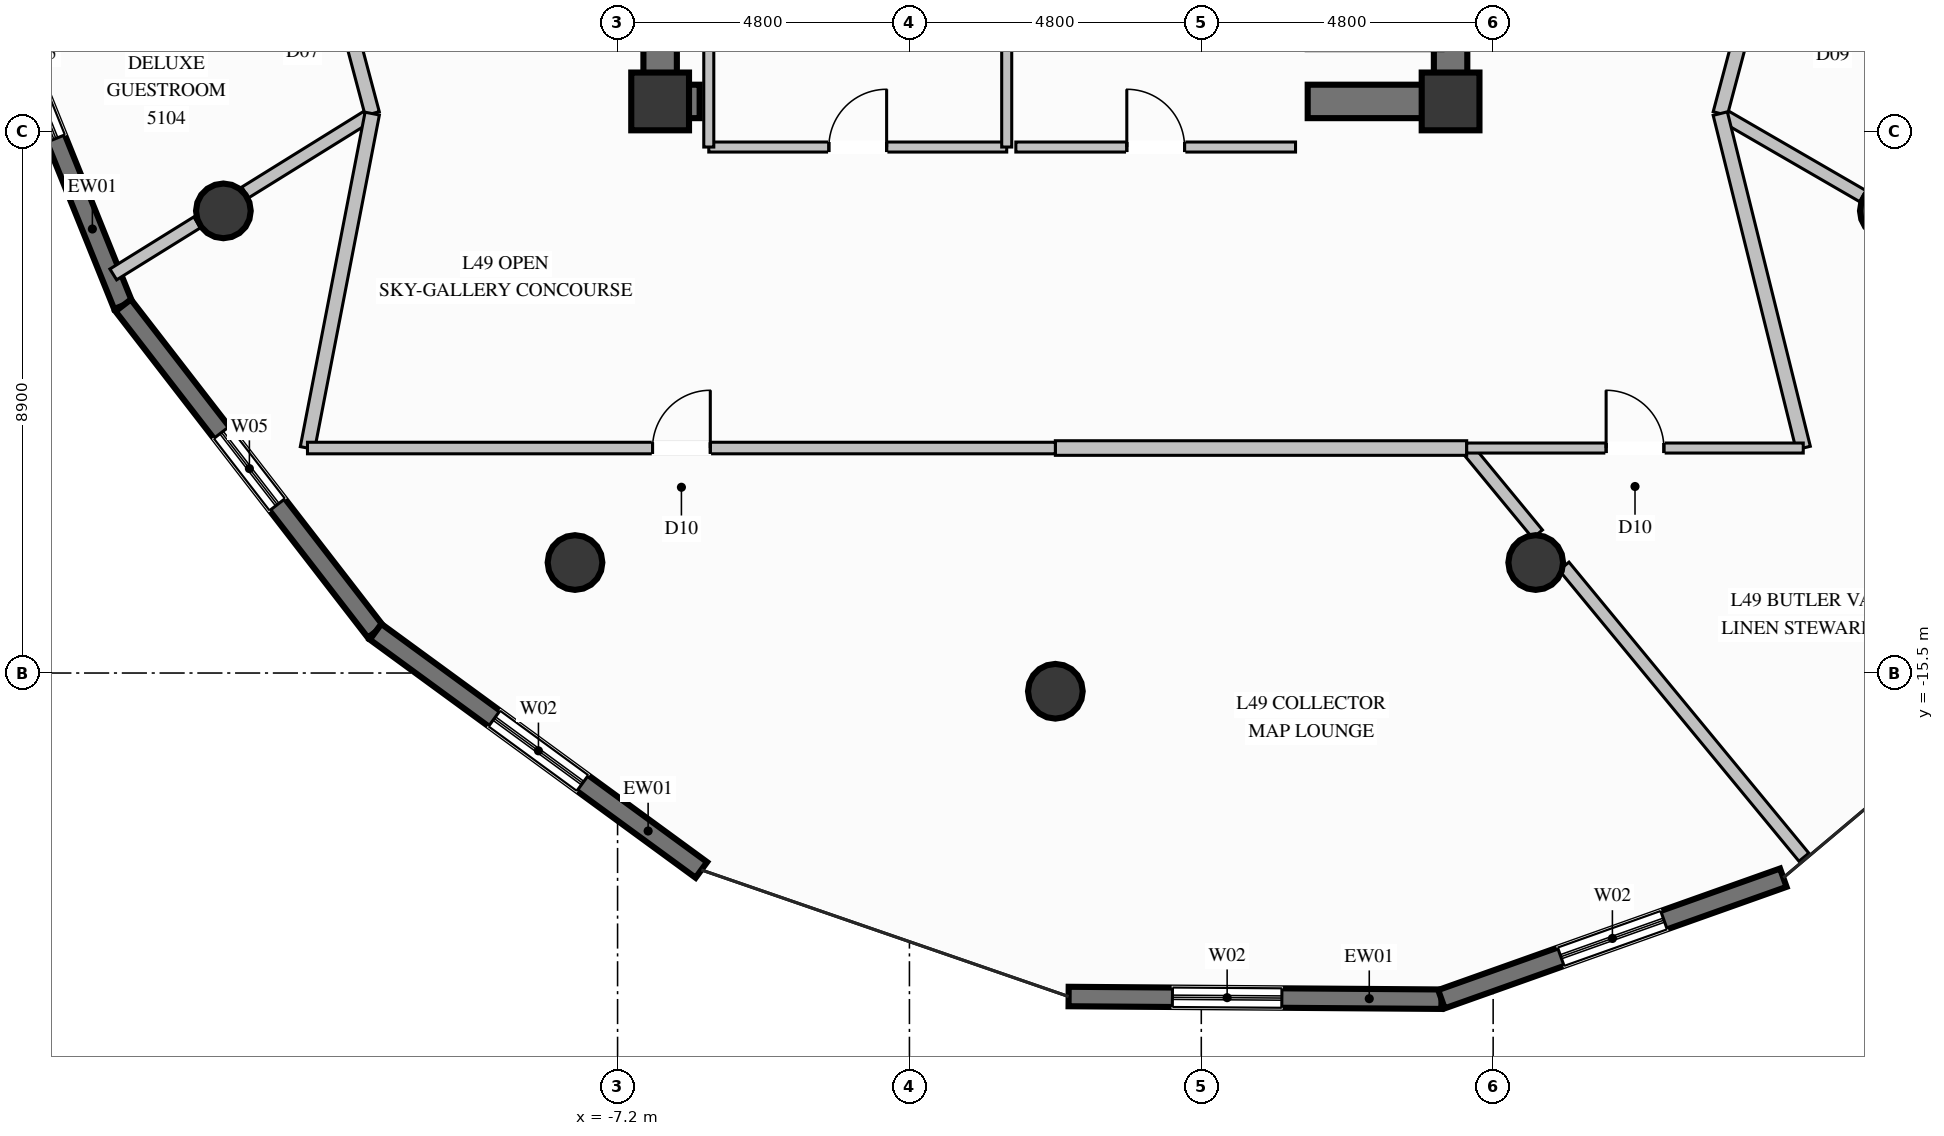
"""IFC4 building model, lengths in metres.
Left out: names, types, materials, properties, quantities, classifications, styles, units other than length and angle.
Written with IfcOpenShell. Run it as: python <this file> out.ifc"""

import sys

from ifc_helpers import new_model, si_unit, direction, frame, frame_2d, origin, origin_2d, place, context, subcontext, project, spatial, rectangle, circle, extrude, element, fill, save


model = new_model("IFC4")
c1 = context("Model", 3, precision=1e-05, world=origin(), true_north=direction((0.0, 1.0)))
c2 = subcontext(c1, "Body", "Model", "MODEL_VIEW")
j1 = project(units=[si_unit("LENGTHUNIT", "METRE"), si_unit("PLANEANGLEUNIT", "RADIAN")], contexts=[c1])
p1 = place(None, origin())
s1 = spatial("IfcSite", under=j1, at=p1, CompositionType="ELEMENT")
p2 = place(p1, origin())
s2 = spatial("IfcBuilding", under=s1, at=p2, CompositionType="ELEMENT")
p3 = place(p2, frame((0.0, 0.0, 191.2)))
s3 = spatial("IfcBuildingStorey", under=s2, at=p3, CompositionType="ELEMENT", Elevation=191.2)
for number, where, z_axis, x_axis in (
    (1, (-6.5, -6.1, 0.0), (0.0, 0.0, 1.0), (1.0, 0.0, 0.0)),
    (2, (6.5, -6.1, 0.0), (0.0, 0.0, 1.0), (1.0, 0.0, 0.0)),
):
    element("IfcColumn", number, at=place(p3, frame(where, z_axis=z_axis, x_axis=x_axis)), inside=s3, PredefinedType="COLUMN", context=c2, shape_type="SweptSolid", body=[
        extrude(rectangle(XDim=0.95, YDim=0.95, at=origin_2d()), origin(), (0.0, 0.0, 1.0), 3.6),
    ])
p4 = place(p3, frame((-6.225, -6.1, 0.0), z_axis=(0.0, 0.0, 1.0), x_axis=(1.0, 0.0, 0.0)))
e3 = element("IfcWall", 3, at=p4, inside=s3, PredefinedType="SHEAR", context=c2, shape_type="SweptSolid", body=[
    extrude(rectangle(XDim=0.375, YDim=0.55, at=frame_2d((0.188, 0.0))), origin(), (0.0, 0.0, 1.0), 3.6),
])
p5 = place(p3, frame((4.15, -6.1, 0.0), z_axis=(0.0, 0.0, 1.0), x_axis=(1.0, 0.0, 0.0)))
e4 = element("IfcWall", 4, at=p5, inside=s3, PredefinedType="SHEAR", context=c2, shape_type="SweptSolid", body=[
    extrude(rectangle(XDim=2.075, YDim=0.55, at=frame_2d((1.038, 0.0))), origin(), (0.0, 0.0, 1.0), 3.6),
])
p6 = place(p3, frame((-6.5, -6.375, 0.0), z_axis=(0.0, 0.0, 1.0), x_axis=(0.0, 1.0, 0.0)))
e5 = element("IfcWall", 5, at=p6, inside=s3, PredefinedType="SHEAR", context=c2, shape_type="SweptSolid", body=[
    extrude(rectangle(XDim=3.025, YDim=0.55, at=frame_2d((1.512, 0.0))), origin(), (0.0, 0.0, 1.0), 3.6),
])
p7 = place(p3, frame((6.5, -6.375, 0.0), z_axis=(0.0, 0.0, 1.0), x_axis=(0.0, 1.0, 0.0)))
e6 = element("IfcWall", 6, at=p7, inside=s3, PredefinedType="SHEAR", context=c2, shape_type="SweptSolid", body=[
    extrude(rectangle(XDim=4.025, YDim=0.55, at=frame_2d((2.012, 0.0))), origin(), (0.0, 0.0, 1.0), 3.6),
])
for number, where, z_axis, x_axis in (
    (7, (-13.683, -7.9, 0.0), (0.0, 0.0, 1.0), (1.0, 0.0, 0.0)),
    (8, (-7.9, -13.683, 0.0), (0.0, 0.0, 1.0), (1.0, 0.0, 0.0)),
    (9, (0.0, -15.8, 0.0), (0.0, 0.0, 1.0), (1.0, 0.0, 0.0)),
    (10, (7.9, -13.683, 0.0), (0.0, 0.0, 1.0), (1.0, 0.0, 0.0)),
    (11, (13.683, -7.9, 0.0), (0.0, 0.0, 1.0), (1.0, 0.0, 0.0)),
):
    element("IfcColumn", number, at=place(p3, frame(where, z_axis=z_axis, x_axis=x_axis)), inside=s3, PredefinedType="COLUMN", context=c2, shape_type="SweptSolid", body=[
        extrude(circle(Radius=0.45, at=origin_2d()), origin(), (0.0, 0.0, 1.0), 3.6),
    ])
p8 = place(p3, frame((-15.331, -9.454, 0.0), z_axis=(0.0, 0.0, 1.0), x_axis=(-0.374000779889, 0.927428388956, 0.0)))
e12 = element("IfcWall", 12, at=p8, inside=s3, PredefinedType="SOLIDWALL", context=c2, shape_type="SweptSolid", body=[
    extrude(rectangle(XDim=6.786, YDim=0.32, at=frame_2d((3.393, 0.0))), origin(), (0.0, 0.0, 1.0), 3.36),
])
p9 = place(p8, frame((2.959, 0.0, 0.85)))
e13 = element("IfcOpeningElement", 13, at=p9, cuts=e12, PredefinedType="OPENING", context=c2, shape_type="SweptSolid", body=[
    extrude(rectangle(XDim=1.5, YDim=1.2, at=frame_2d((0.75, 0.6))), frame((0.0, 0.17, 0.0), z_axis=(0.0, -1.0, 0.0), x_axis=(1.0, 0.0, 0.0)), (0.0, 0.0, 1.0), 0.34),
])
p10 = place(p3, frame((-11.18, -14.821, 0.0), z_axis=(0.0, 0.0, 1.0), x_axis=(-0.611810985794, 0.791003993455, 0.0)))
e14 = element("IfcWall", 14, at=p10, inside=s3, PredefinedType="SOLIDWALL", context=c2, shape_type="SweptSolid", body=[
    extrude(rectangle(XDim=6.785, YDim=0.32, at=frame_2d((3.393, 0.0))), origin(), (0.0, 0.0, 1.0), 3.36),
])
p11 = place(p10, frame((2.642, 0.0, 0.85)))
e15 = element("IfcOpeningElement", 15, at=p11, cuts=e14, PredefinedType="OPENING", context=c2, shape_type="SweptSolid", body=[
    extrude(rectangle(XDim=1.5, YDim=1.2, at=frame_2d((0.75, 0.6))), frame((0.0, 0.17, 0.0), z_axis=(0.0, -1.0, 0.0), x_axis=(1.0, 0.0, 0.0)), (0.0, 0.0, 1.0), 0.34),
])
p12 = place(p3, frame((-5.822, -18.738, 0.0), z_axis=(0.0, 0.0, 1.0), x_axis=(-0.80727653181, 0.590173365368, 0.0)))
e16 = element("IfcWall", 16, at=p12, inside=s3, PredefinedType="SOLIDWALL", context=c2, shape_type="SweptSolid", body=[
    extrude(rectangle(XDim=6.637, YDim=0.32, at=frame_2d((3.318, 0.0))), origin(), (0.0, 0.0, 1.0), 3.36),
])
p13 = place(p12, frame((2.419, 0.0, 0.35)))
e17 = element("IfcOpeningElement", 17, at=p13, cuts=e16, PredefinedType="OPENING", context=c2, shape_type="SweptSolid", body=[
    extrude(rectangle(XDim=1.8, YDim=2.6, at=frame_2d((0.9, 1.3))), frame((0.0, 0.17, 0.0), z_axis=(0.0, -1.0, 0.0), x_axis=(1.0, 0.0, 0.0)), (0.0, 0.0, 1.0), 0.34),
])
p14 = place(p3, frame((6.35, -20.864, 0.0), z_axis=(0.0, 0.0, 1.0), x_axis=(-0.999974321908, 0.007166276942, 0.0)))
e18 = element("IfcWall", 18, at=p14, inside=s3, PredefinedType="SOLIDWALL", context=c2, shape_type="SweptSolid", body=[
    extrude(rectangle(XDim=6.132, YDim=0.32, at=frame_2d((3.066, 0.0))), origin(), (0.0, 0.0, 1.0), 3.36),
])
p15 = place(p14, frame((2.625, 0.0, 0.35)))
e19 = element("IfcOpeningElement", 19, at=p15, cuts=e18, PredefinedType="OPENING", context=c2, shape_type="SweptSolid", body=[
    extrude(rectangle(XDim=1.8, YDim=2.6, at=frame_2d((0.9, 1.3))), frame((0.0, 0.17, 0.0), z_axis=(0.0, -1.0, 0.0), x_axis=(1.0, 0.0, 0.0)), (0.0, 0.0, 1.0), 0.34),
])
p16 = place(p3, frame((11.972, -18.866, 0.0), z_axis=(0.0, 0.0, 1.0), x_axis=(-0.942258310851, -0.334886959483, 0.0)))
e20 = element("IfcWall", 20, at=p16, inside=s3, PredefinedType="SOLIDWALL", context=c2, shape_type="SweptSolid", body=[
    extrude(rectangle(XDim=5.966, YDim=0.32, at=frame_2d((2.983, 0.0))), origin(), (0.0, 0.0, 1.0), 3.36),
])
p17 = place(p16, frame((2.083, 0.0, 0.35)))
e21 = element("IfcOpeningElement", 21, at=p17, cuts=e20, PredefinedType="OPENING", context=c2, shape_type="SweptSolid", body=[
    extrude(rectangle(XDim=1.8, YDim=2.6, at=frame_2d((0.9, 1.3))), frame((0.0, 0.17, 0.0), z_axis=(0.0, -1.0, 0.0), x_axis=(1.0, 0.0, 0.0)), (0.0, 0.0, 1.0), 0.34),
])
p18 = place(p3, frame((-5.7, -6.85, 0.0), z_axis=(0.0, 0.0, 1.0), x_axis=(1.0, 0.0, 0.0)))
e22 = element("IfcWall", 22, at=p18, inside=s3, PredefinedType="PARTITIONING", context=c2, shape_type="SweptSolid", body=[
    extrude(rectangle(XDim=4.9, YDim=0.165, at=frame_2d((2.45, 0.0))), origin(), (0.0, 0.0, 1.0), 2.445),
])
p19 = place(p18, frame((1.975, 0.0, 0.0)))
e23 = element("IfcOpeningElement", 23, at=p19, cuts=e22, PredefinedType="OPENING", context=c2, shape_type="SweptSolid", body=[
    extrude(rectangle(XDim=0.95, YDim=2.1, at=frame_2d((0.475, 1.05))), frame((0.0, 0.093, 0.0), z_axis=(0.0, -1.0, 0.0), x_axis=(1.0, 0.0, 0.0)), (0.0, 0.0, 1.0), 0.185),
])
p20 = place(p3, frame((-0.8, -6.85, 0.0), z_axis=(0.0, 0.0, 1.0), x_axis=(0.0, 1.0, 0.0)))
e24 = element("IfcWall", 24, at=p20, inside=s3, PredefinedType="PARTITIONING", context=c2, shape_type="SweptSolid", body=[
    extrude(rectangle(XDim=3.35, YDim=0.165, at=frame_2d((1.675, 0.0))), origin(), (0.0, 0.0, 1.0), 3.36),
])
p21 = place(p3, frame((-5.7, -3.5, 0.0), z_axis=(0.0, 0.0, 1.0), x_axis=(0.0, -1.0, 0.0)))
e25 = element("IfcWall", 25, at=p21, inside=s3, PredefinedType="PARTITIONING", context=c2, shape_type="SweptSolid", body=[
    extrude(rectangle(XDim=3.35, YDim=0.165, at=frame_2d((1.675, 0.0))), origin(), (0.0, 0.0, 1.0), 2.445),
])
p22 = place(p3, frame((-0.65, -6.85, 0.0), z_axis=(0.0, 0.0, 1.0), x_axis=(1.0, 0.0, 0.0)))
e26 = element("IfcWall", 26, at=p22, inside=s3, PredefinedType="PARTITIONING", context=c2, shape_type="SweptSolid", body=[
    extrude(rectangle(XDim=4.6, YDim=0.165, at=frame_2d((2.3, 0.0))), origin(), (0.0, 0.0, 1.0), 2.445),
])
p23 = place(p22, frame((1.825, 0.0, 0.0)))
e27 = element("IfcOpeningElement", 27, at=p23, cuts=e26, PredefinedType="OPENING", context=c2, shape_type="SweptSolid", body=[
    extrude(rectangle(XDim=0.95, YDim=2.1, at=frame_2d((0.475, 1.05))), frame((0.0, 0.093, 0.0), z_axis=(0.0, -1.0, 0.0), x_axis=(1.0, 0.0, 0.0)), (0.0, 0.0, 1.0), 0.185),
])
p24 = place(p3, frame((-11.235, -6.3, 0.0), z_axis=(0.0, 0.0, 1.0), x_axis=(-0.8495787928, -0.527461728302, 0.0)))
e28 = element("IfcWall", 28, at=p24, inside=s3, PredefinedType="PARTITIONING", context=c2, shape_type="SweptSolid", body=[
    extrude(rectangle(XDim=2.459, YDim=0.21, at=frame_2d((1.229, 0.0))), origin(), (0.0, 0.0, 1.0), 2.876),
])
p25 = place(p3, frame((-14.114, -8.088, 0.0), z_axis=(0.0, 0.0, 1.0), x_axis=(-0.849447375162, -0.527673342922, 0.0)))
e29 = element("IfcWall", 29, at=p25, inside=s3, PredefinedType="PARTITIONING", context=c2, shape_type="SweptSolid", body=[
    extrude(rectangle(XDim=1.625, YDim=0.21, at=frame_2d((0.812, 0.0))), origin(), (0.0, 0.0, 1.0), 3.36),
])
p26 = place(p3, frame((10.935, -6.3, 0.0), z_axis=(0.0, 0.0, 1.0), x_axis=(0.865378990195, -0.50111795351, 0.0)))
e30 = element("IfcWall", 30, at=p26, inside=s3, PredefinedType="PARTITIONING", context=c2, shape_type="SweptSolid", body=[
    extrude(rectangle(XDim=2.71, YDim=0.21, at=frame_2d((1.355, 0.0))), origin(), (0.0, 0.0, 1.0), 2.876),
])
p27 = place(p3, frame((-12.23, -2.559, 0.0), z_axis=(0.0, 0.0, 1.0), x_axis=(0.257007037833, -0.966409531464, 0.0)))
e31 = element("IfcWall", 31, at=p27, inside=s3, PredefinedType="PARTITIONING", context=c2, shape_type="SweptSolid", body=[
    extrude(rectangle(XDim=3.871, YDim=0.24, at=frame_2d((1.936, 0.0))), origin(), (0.0, 0.0, 1.0), 3.36),
])
p28 = place(p27, frame((1.436, 0.0, 0.0)))
e32 = element("IfcOpeningElement", 32, at=p28, cuts=e31, PredefinedType="OPENING", context=c2, shape_type="SweptSolid", body=[
    extrude(rectangle(XDim=1.0, YDim=2.2, at=frame_2d((0.5, 1.1))), frame((0.0, 0.13, 0.0), z_axis=(0.0, -1.0, 0.0), x_axis=(1.0, 0.0, 0.0)), (0.0, 0.0, 1.0), 0.26),
])
p29 = place(p3, frame((10.935, -6.3, 0.0), z_axis=(0.0, 0.0, 1.0), x_axis=(0.25685481711, 0.966450000221, 0.0)))
e33 = element("IfcWall", 33, at=p29, inside=s3, PredefinedType="PARTITIONING", context=c2, shape_type="SweptSolid", body=[
    extrude(rectangle(XDim=2.803, YDim=0.24, at=frame_2d((1.401, 0.0))), origin(), (0.0, 0.0, 1.0), 3.36),
])
p30 = place(p3, frame((6.765, -11.8, 0.0), z_axis=(0.0, 0.0, 1.0), x_axis=(0.635875381736, -0.771791745811, 0.0)))
e34 = element("IfcWall", 34, at=p30, inside=s3, PredefinedType="PARTITIONING", context=c2, shape_type="SweptSolid", body=[
    extrude(rectangle(XDim=1.832, YDim=0.21, at=frame_2d((0.916, 0.0))), origin(), (0.0, 0.0, 1.0), 3.36),
])
p31 = place(p3, frame((8.366, -13.743, 0.0), z_axis=(0.0, 0.0, 1.0), x_axis=(0.636047975174, -0.771649514532, 0.0)))
e35 = element("IfcWall", 35, at=p31, inside=s3, PredefinedType="PARTITIONING", context=c2, shape_type="SweptSolid", body=[
    extrude(rectangle(XDim=6.202, YDim=0.21, at=frame_2d((3.101, 0.0))), origin(), (0.0, 0.0, 1.0), 3.36),
])
p32 = place(p3, frame((-11.235, -6.3, 0.0), z_axis=(0.0, 0.0, 1.0), x_axis=(-0.190095078136, -0.981765685522, 0.0)))
e36 = element("IfcWall", 36, at=p32, inside=s3, PredefinedType="PARTITIONING", context=c2, shape_type="SweptSolid", body=[
    extrude(rectangle(XDim=5.602, YDim=0.24, at=frame_2d((2.801, 0.0))), origin(), (0.0, 0.0, 1.0), 3.36),
])
p33 = place(p3, frame((0.0, -11.8, 0.0), z_axis=(0.0, 0.0, 1.0), x_axis=(1.0, 0.0, 0.0)))
e37 = element("IfcWall", 37, at=p33, inside=s3, PredefinedType="PARTITIONING", context=c2, shape_type="SweptSolid", body=[
    extrude(rectangle(XDim=6.765, YDim=0.24, at=frame_2d((3.382, 0.0))), origin(), (0.0, 0.0, 1.0), 3.36),
])
p34 = place(p3, frame((-12.3, -11.8, 0.0), z_axis=(0.0, 0.0, 1.0), x_axis=(1.0, 0.0, 0.0)))
e38 = element("IfcWall", 38, at=p34, inside=s3, PredefinedType="PARTITIONING", context=c2, shape_type="SweptSolid", body=[
    extrude(rectangle(XDim=12.3, YDim=0.19, at=frame_2d((6.15, 0.0))), origin(), (0.0, 0.0, 1.0), 3.36),
])
p35 = place(p34, frame((5.675, 0.0, 0.0)))
e39 = element("IfcOpeningElement", 39, at=p35, cuts=e38, PredefinedType="OPENING", context=c2, shape_type="SweptSolid", body=[
    extrude(rectangle(XDim=0.95, YDim=2.1, at=frame_2d((0.475, 1.05))), frame((0.0, 0.105, 0.0), z_axis=(0.0, -1.0, 0.0), x_axis=(1.0, 0.0, 0.0)), (0.0, 0.0, 1.0), 0.21),
])
p36 = place(p3, frame((12.3, -11.8, 0.0), z_axis=(0.0, 0.0, 1.0), x_axis=(-0.240872801332, 0.970556692614, 0.0)))
e40 = element("IfcWall", 40, at=p36, inside=s3, PredefinedType="PARTITIONING", context=c2, shape_type="SweptSolid", body=[
    extrude(rectangle(XDim=5.667, YDim=0.24, at=frame_2d((2.833, 0.0))), origin(), (0.0, 0.0, 1.0), 3.36),
])
p37 = place(p3, frame((6.765, -11.8, 0.0), z_axis=(0.0, 0.0, 1.0), x_axis=(1.0, 0.0, 0.0)))
e41 = element("IfcWall", 41, at=p37, inside=s3, PredefinedType="PARTITIONING", context=c2, shape_type="SweptSolid", body=[
    extrude(rectangle(XDim=5.535, YDim=0.165, at=frame_2d((2.768, 0.0))), origin(), (0.0, 0.0, 1.0), 3.36),
])
p38 = place(p37, frame((2.293, 0.0, 0.0)))
e42 = element("IfcOpeningElement", 42, at=p38, cuts=e41, PredefinedType="OPENING", context=c2, shape_type="SweptSolid", body=[
    extrude(rectangle(XDim=0.95, YDim=2.1, at=frame_2d((0.475, 1.05))), frame((0.0, 0.093, 0.0), z_axis=(0.0, -1.0, 0.0), x_axis=(1.0, 0.0, 0.0)), (0.0, 0.0, 1.0), 0.185),
])
p39 = place(p9, origin())
e43 = element("IfcWindow", 43, at=p39, inside=s3, PartitioningType="SINGLE_PANEL", PredefinedType="WINDOW", context=c2, shape_type="SweptSolid", body=[
    extrude(rectangle(XDim=1.5, YDim=1.2, at=frame_2d((0.75, 0.6))), frame((0.0, 0.03, 0.0), z_axis=(0.0, -1.0, 0.0), x_axis=(1.0, 0.0, 0.0)), (0.0, 0.0, 1.0), 0.06),
])
fill(e13, e43)
p40 = place(p11, origin())
e44 = element("IfcWindow", 44, at=p40, inside=s3, PartitioningType="SINGLE_PANEL", PredefinedType="WINDOW", context=c2, shape_type="SweptSolid", body=[
    extrude(rectangle(XDim=1.5, YDim=1.2, at=frame_2d((0.75, 0.6))), frame((0.0, 0.03, 0.0), z_axis=(0.0, -1.0, 0.0), x_axis=(1.0, 0.0, 0.0)), (0.0, 0.0, 1.0), 0.06),
])
fill(e15, e44)
p41 = place(p13, origin())
e45 = element("IfcWindow", 45, at=p41, inside=s3, PartitioningType="SINGLE_PANEL", PredefinedType="WINDOW", context=c2, shape_type="SweptSolid", body=[
    extrude(rectangle(XDim=1.8, YDim=2.6, at=frame_2d((0.9, 1.3))), frame((0.0, 0.03, 0.0), z_axis=(0.0, -1.0, 0.0), x_axis=(1.0, 0.0, 0.0)), (0.0, 0.0, 1.0), 0.06),
])
fill(e17, e45)
p42 = place(p15, origin())
e46 = element("IfcWindow", 46, at=p42, inside=s3, PartitioningType="SINGLE_PANEL", PredefinedType="WINDOW", context=c2, shape_type="SweptSolid", body=[
    extrude(rectangle(XDim=1.8, YDim=2.6, at=frame_2d((0.9, 1.3))), frame((0.0, 0.03, 0.0), z_axis=(0.0, -1.0, 0.0), x_axis=(1.0, 0.0, 0.0)), (0.0, 0.0, 1.0), 0.06),
])
fill(e19, e46)
p43 = place(p17, origin())
e47 = element("IfcWindow", 47, at=p43, inside=s3, PartitioningType="SINGLE_PANEL", PredefinedType="WINDOW", context=c2, shape_type="SweptSolid", body=[
    extrude(rectangle(XDim=1.8, YDim=2.6, at=frame_2d((0.9, 1.3))), frame((0.0, 0.03, 0.0), z_axis=(0.0, -1.0, 0.0), x_axis=(1.0, 0.0, 0.0)), (0.0, 0.0, 1.0), 0.06),
])
fill(e21, e47)
p44 = place(p19, origin())
e48 = element("IfcDoor", 48, at=p44, inside=s3, OperationType="SINGLE_SWING_RIGHT", PredefinedType="DOOR", context=c2, shape_type="SweptSolid", body=[
    extrude(rectangle(XDim=0.95, YDim=2.1, at=frame_2d((0.475, 1.05))), frame((0.0, 0.025, 0.0), z_axis=(0.0, -1.0, 0.0), x_axis=(1.0, 0.0, 0.0)), (0.0, 0.0, 1.0), 0.05),
])
fill(e23, e48)
p45 = place(p23, origin())
e49 = element("IfcDoor", 49, at=p45, inside=s3, OperationType="SINGLE_SWING_LEFT", PredefinedType="DOOR", context=c2, shape_type="SweptSolid", body=[
    extrude(rectangle(XDim=0.95, YDim=2.1, at=frame_2d((0.475, 1.05))), frame((0.0, 0.025, 0.0), z_axis=(0.0, -1.0, 0.0), x_axis=(1.0, 0.0, 0.0)), (0.0, 0.0, 1.0), 0.05),
])
fill(e27, e49)
p46 = place(p35, origin())
e50 = element("IfcDoor", 50, at=p46, inside=s3, OperationType="SINGLE_SWING_RIGHT", PredefinedType="DOOR", context=c2, shape_type="SweptSolid", body=[
    extrude(rectangle(XDim=0.95, YDim=2.1, at=frame_2d((0.475, 1.05))), frame((0.0, 0.025, 0.0), z_axis=(0.0, -1.0, 0.0), x_axis=(1.0, 0.0, 0.0)), (0.0, 0.0, 1.0), 0.05),
])
fill(e39, e50)
p47 = place(p38, origin())
e51 = element("IfcDoor", 51, at=p47, inside=s3, OperationType="SINGLE_SWING_LEFT", PredefinedType="DOOR", context=c2, shape_type="SweptSolid", body=[
    extrude(rectangle(XDim=0.95, YDim=2.1, at=frame_2d((0.475, 1.05))), frame((0.0, 0.025, 0.0), z_axis=(0.0, -1.0, 0.0), x_axis=(1.0, 0.0, 0.0)), (0.0, 0.0, 1.0), 0.05),
])
fill(e42, e51)
save(model, sys.argv[1])
